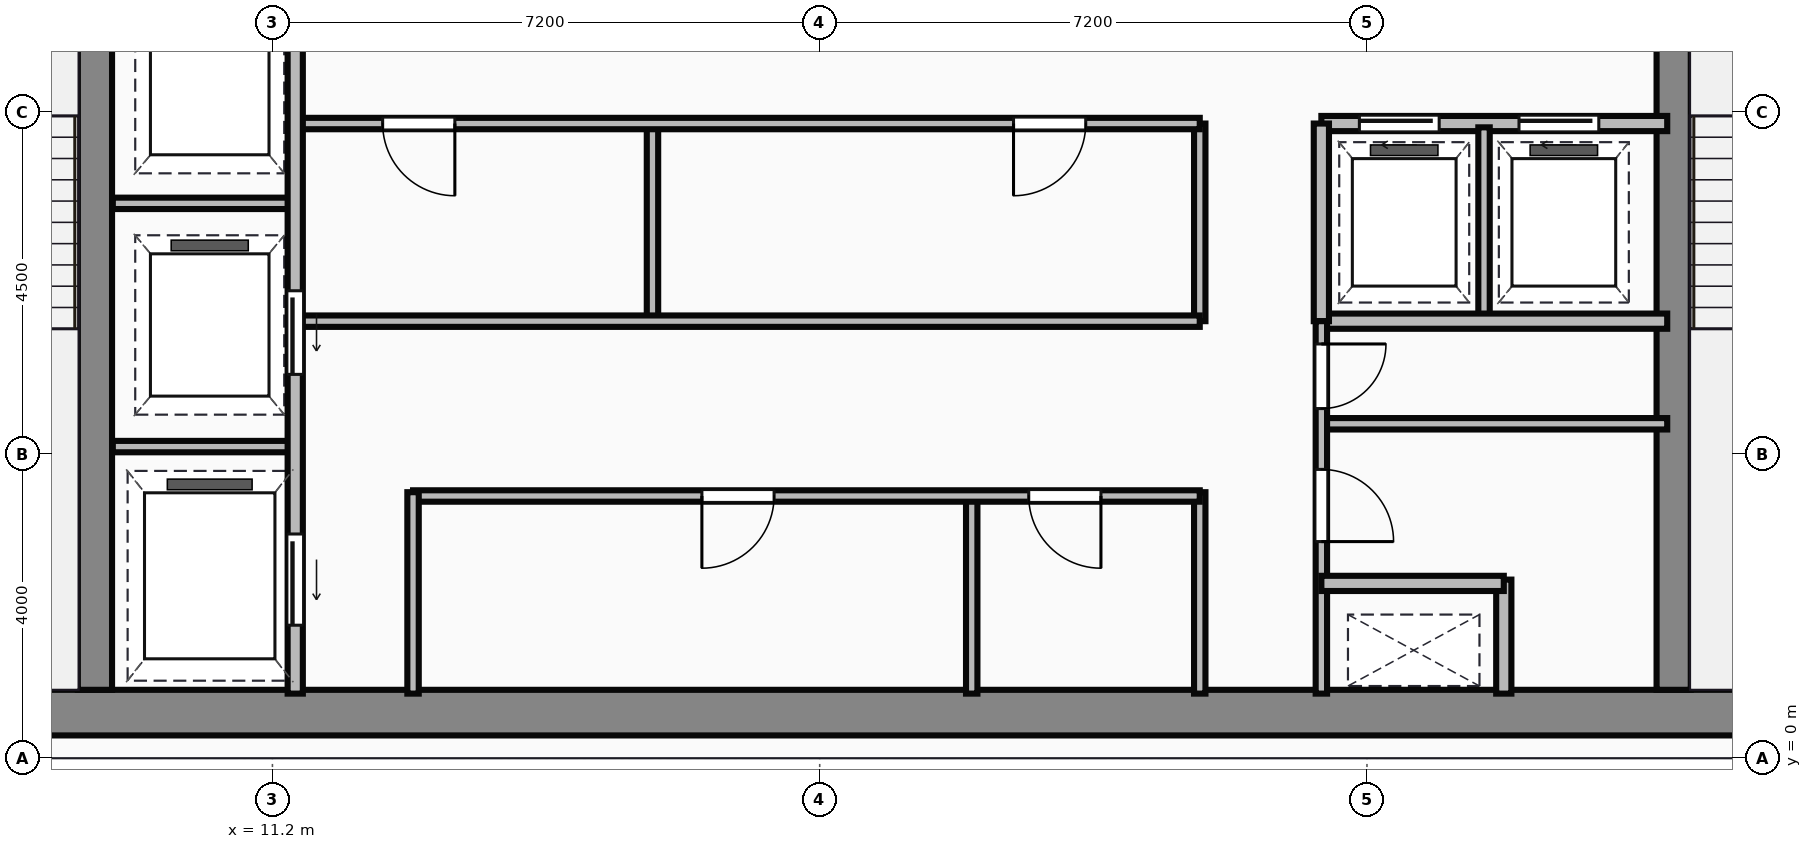
"""IFC4 building model, lengths in metres.
Left out: names, types, materials, properties, quantities, classifications, styles, units other than length and angle.
Written with IfcOpenShell. Run it as: python <this file> out.ifc"""

import sys

from ifc_helpers import new_model, si_unit, direction, frame, frame_2d, origin, place, context, subcontext, project, spatial, rectangle, extrude, source, transform, mapped, element, fill, save


model = new_model("IFC4")
c1 = context("Model", 3, precision=1e-05, world=origin(), true_north=direction((0.0, 1.0)))
c2 = subcontext(c1, "Body", "Model", "MODEL_VIEW")
j1 = project(units=[si_unit("LENGTHUNIT", "METRE"), si_unit("PLANEANGLEUNIT", "RADIAN")], contexts=[c1])
p1 = place(None, origin())
s1 = spatial("IfcSite", under=j1, at=p1, CompositionType="ELEMENT")
p2 = place(p1, origin())
s2 = spatial("IfcBuilding", under=s1, at=p2, CompositionType="ELEMENT")
p3 = place(p2, frame((0.0, 0.0, 277.05)))
s3 = spatial("IfcBuildingStorey", under=s2, at=p3, CompositionType="ELEMENT", Elevation=277.05)
m1 = source(origin(), c2, "Body", "SweptSolid", [
    extrude(rectangle(XDim=29.5, YDim=0.6, at=frame_2d((14.75, 0.0))), origin(), (0.0, 0.0, 1.0), 3.65),
])
p4 = place(p3, frame((4.5, 0.6, 0.0), z_axis=(0.0, 0.0, 1.0), x_axis=(1.0, 0.0, 0.0)))
e1 = element("IfcWall", 1, at=p4, inside=s3, PredefinedType="SHEAR", context=c2, shape_type="MappedRepresentation", body=[
    mapped(m1, transform((0.0, 0.0, 0.0))),
])
m2 = source(origin(), c2, "Body", "SweptSolid", [
    extrude(rectangle(XDim=12.5, YDim=0.45, at=frame_2d((6.25, 0.0))), origin(), (0.0, 0.0, 1.0), 3.65),
])
for number, where, z_axis, x_axis in (
    (2, (8.865, 0.9, 0.0), (0.0, 0.0, 1.0), (0.0, 1.0, 0.0)),
    (3, (29.635, 0.9, 0.0), (0.0, 0.0, 1.0), (0.0, 1.0, 0.0)),
):
    element("IfcWall", number, at=place(p3, frame(where, z_axis=z_axis, x_axis=x_axis)), inside=s3, PredefinedType="SHEAR", context=c2, shape_type="MappedRepresentation", body=[
        mapped(m2, transform((0.0, 0.0, 0.0))),
    ])
m3 = source(origin(), c2, "Body", "SweptSolid", [
    extrude(rectangle(XDim=9.6, YDim=0.2, at=frame_2d((4.8, 0.0))), origin(), (0.0, 0.0, 1.0), 3.4),
])
p5 = place(p3, frame((11.5, 0.85, 0.0), z_axis=(0.0, 0.0, 1.0), x_axis=(0.0, 1.0, 0.0)))
e4 = element("IfcWall", 4, at=p5, inside=s3, PredefinedType="PARTITIONING", context=c2, shape_type="MappedRepresentation", body=[
    mapped(m3, transform((0.0, 0.0, 0.0))),
])
p6 = place(p5, frame((4.2, 0.0, 0.0)))
e5 = element("IfcOpeningElement", 5, at=p6, cuts=e4, PredefinedType="OPENING", context=c2, shape_type="SweptSolid", body=[
    extrude(rectangle(XDim=1.1, YDim=2.15, at=frame_2d((0.55, 1.075))), frame((0.0, 0.11, 0.0), z_axis=(0.0, -1.0, 0.0), x_axis=(1.0, 0.0, 0.0)), (0.0, 0.0, 1.0), 0.22),
])
p7 = place(p5, frame((0.9, 0.0, 0.0)))
e6 = element("IfcOpeningElement", 6, at=p7, cuts=e4, PredefinedType="OPENING", context=c2, shape_type="SweptSolid", body=[
    extrude(rectangle(XDim=1.2, YDim=2.15, at=frame_2d((0.6, 1.075))), frame((0.0, 0.11, 0.0), z_axis=(0.0, -1.0, 0.0), x_axis=(1.0, 0.0, 0.0)), (0.0, 0.0, 1.0), 0.22),
])
m4 = source(origin(), c2, "Body", "SweptSolid", [
    extrude(rectangle(XDim=2.4, YDim=0.15, at=frame_2d((1.2, 0.0))), origin(), (0.0, 0.0, 1.0), 3.4),
])
for number, where, z_axis, x_axis in (
    (7, (9.1, 4.1, 0.0), (0.0, 0.0, 1.0), (1.0, 0.0, 0.0)),
    (8, (9.1, 7.3, 0.0), (0.0, 0.0, 1.0), (1.0, 0.0, 0.0)),
):
    element("IfcWall", number, at=place(p3, frame(where, z_axis=z_axis, x_axis=x_axis)), inside=s3, PredefinedType="PARTITIONING", context=c2, shape_type="MappedRepresentation", body=[
        mapped(m4, transform((0.0, 0.0, 0.0))),
    ])
m5 = source(origin(), c2, "Body", "SweptSolid", [
    extrude(rectangle(XDim=2.65, YDim=0.15, at=frame_2d((1.325, 0.0))), origin(), (0.0, 0.0, 1.0), 3.4),
])
p8 = place(p3, frame((13.05, 0.85, 0.0), z_axis=(0.0, 0.0, 1.0), x_axis=(0.0, 1.0, 0.0)))
e9 = element("IfcWall", 9, at=p8, inside=s3, PredefinedType="PARTITIONING", context=c2, shape_type="MappedRepresentation", body=[
    mapped(m5, transform((0.0, 0.0, 0.0))),
])
m6 = source(origin(), c2, "Body", "SweptSolid", [
    extrude(rectangle(XDim=10.35, YDim=0.15, at=frame_2d((5.175, 0.0))), origin(), (0.0, 0.0, 1.0), 3.4),
])
p9 = place(p3, frame((13.05, 3.45, 0.0), z_axis=(0.0, 0.0, 1.0), x_axis=(1.0, 0.0, 0.0)))
e10 = element("IfcWall", 10, at=p9, inside=s3, PredefinedType="PARTITIONING", context=c2, shape_type="MappedRepresentation", body=[
    mapped(m6, transform((0.0, 0.0, 0.0))),
])
p10 = place(p9, frame((3.8, 0.0, 0.0)))
e11 = element("IfcOpeningElement", 11, at=p10, cuts=e10, PredefinedType="OPENING", context=c2, shape_type="SweptSolid", body=[
    extrude(rectangle(XDim=0.95, YDim=2.15, at=frame_2d((0.475, 1.075))), frame((0.0, 0.085, 0.0), z_axis=(0.0, -1.0, 0.0), x_axis=(1.0, 0.0, 0.0)), (0.0, 0.0, 1.0), 0.17),
])
p11 = place(p9, frame((8.1, 0.0, 0.0)))
e12 = element("IfcOpeningElement", 12, at=p11, cuts=e10, PredefinedType="OPENING", context=c2, shape_type="SweptSolid", body=[
    extrude(rectangle(XDim=0.95, YDim=2.15, at=frame_2d((0.475, 1.075))), frame((0.0, 0.085, 0.0), z_axis=(0.0, -1.0, 0.0), x_axis=(1.0, 0.0, 0.0)), (0.0, 0.0, 1.0), 0.17),
])
p12 = place(p3, frame((23.4, 0.85, 0.0), z_axis=(0.0, 0.0, 1.0), x_axis=(0.0, 1.0, 0.0)))
e13 = element("IfcWall", 13, at=p12, inside=s3, PredefinedType="PARTITIONING", context=c2, shape_type="MappedRepresentation", body=[
    mapped(m5, transform((0.0, 0.0, 0.0))),
])
m7 = source(origin(), c2, "Body", "SweptSolid", [
    extrude(rectangle(XDim=2.6, YDim=0.15, at=frame_2d((1.3, 0.0))), origin(), (0.0, 0.0, 1.0), 3.4),
])
p13 = place(p3, frame((20.4, 0.85, 0.0), z_axis=(0.0, 0.0, 1.0), x_axis=(0.0, 1.0, 0.0)))
e14 = element("IfcWall", 14, at=p13, inside=s3, PredefinedType="PARTITIONING", context=c2, shape_type="MappedRepresentation", body=[
    mapped(m7, transform((0.0, 0.0, 0.0))),
])
m8 = source(origin(), c2, "Body", "SweptSolid", [
    extrude(rectangle(XDim=11.85, YDim=0.15, at=frame_2d((5.925, 0.0))), origin(), (0.0, 0.0, 1.0), 3.4),
])
p14 = place(p3, frame((11.55, 5.75, 0.0), z_axis=(0.0, 0.0, 1.0), x_axis=(1.0, 0.0, 0.0)))
e15 = element("IfcWall", 15, at=p14, inside=s3, PredefinedType="PARTITIONING", context=c2, shape_type="MappedRepresentation", body=[
    mapped(m8, transform((0.0, 0.0, 0.0))),
])
p15 = place(p3, frame((11.55, 8.35, 0.0), z_axis=(0.0, 0.0, 1.0), x_axis=(1.0, 0.0, 0.0)))
e16 = element("IfcWall", 16, at=p15, inside=s3, PredefinedType="PARTITIONING", context=c2, shape_type="MappedRepresentation", body=[
    mapped(m8, transform((0.0, 0.0, 0.0))),
])
p16 = place(p15, frame((1.1, 0.0, 0.0)))
e17 = element("IfcOpeningElement", 17, at=p16, cuts=e16, PredefinedType="OPENING", context=c2, shape_type="SweptSolid", body=[
    extrude(rectangle(XDim=0.95, YDim=2.15, at=frame_2d((0.475, 1.075))), frame((0.0, 0.085, 0.0), z_axis=(0.0, -1.0, 0.0), x_axis=(1.0, 0.0, 0.0)), (0.0, 0.0, 1.0), 0.17),
])
p17 = place(p15, frame((9.4, 0.0, 0.0)))
e18 = element("IfcOpeningElement", 18, at=p17, cuts=e16, PredefinedType="OPENING", context=c2, shape_type="SweptSolid", body=[
    extrude(rectangle(XDim=0.95, YDim=2.15, at=frame_2d((0.475, 1.075))), frame((0.0, 0.085, 0.0), z_axis=(0.0, -1.0, 0.0), x_axis=(1.0, 0.0, 0.0)), (0.0, 0.0, 1.0), 0.17),
])
m9 = source(origin(), c2, "Body", "SweptSolid", [
    extrude(rectangle(XDim=2.6, YDim=0.15, at=frame_2d((1.3, 0.0))), origin(), (0.0, 0.0, 1.0), 3.4),
])
p18 = place(p3, frame((23.4, 5.75, 0.0), z_axis=(0.0, 0.0, 1.0), x_axis=(0.0, 1.0, 0.0)))
e19 = element("IfcWall", 19, at=p18, inside=s3, PredefinedType="PARTITIONING", context=c2, shape_type="MappedRepresentation", body=[
    mapped(m9, transform((0.0, 0.0, 0.0))),
])
m10 = source(origin(), c2, "Body", "SweptSolid", [
    extrude(rectangle(XDim=2.5, YDim=0.15, at=frame_2d((1.25, 0.0))), origin(), (0.0, 0.0, 1.0), 3.4),
])
p19 = place(p3, frame((16.2, 5.8, 0.0), z_axis=(0.0, 0.0, 1.0), x_axis=(0.0, 1.0, 0.0)))
e20 = element("IfcWall", 20, at=p19, inside=s3, PredefinedType="PARTITIONING", context=c2, shape_type="MappedRepresentation", body=[
    mapped(m10, transform((0.0, 0.0, 0.0))),
])
m11 = source(origin(), c2, "Body", "SweptSolid", [
    extrude(rectangle(XDim=4.55, YDim=0.2, at=frame_2d((2.275, 0.0))), origin(), (0.0, 0.0, 1.0), 3.4),
])
p20 = place(p3, frame((25.0, 8.35, 0.0), z_axis=(0.0, 0.0, 1.0), x_axis=(1.0, 0.0, 0.0)))
e21 = element("IfcWall", 21, at=p20, inside=s3, PredefinedType="PARTITIONING", context=c2, shape_type="MappedRepresentation", body=[
    mapped(m11, transform((0.0, 0.0, 0.0))),
])
p21 = place(p20, frame((0.5, 0.0, 0.0)))
e22 = element("IfcOpeningElement", 22, at=p21, cuts=e21, PredefinedType="OPENING", context=c2, shape_type="SweptSolid", body=[
    extrude(rectangle(XDim=1.05, YDim=2.15, at=frame_2d((0.525, 1.075))), frame((0.0, 0.11, 0.0), z_axis=(0.0, -1.0, 0.0), x_axis=(1.0, 0.0, 0.0)), (0.0, 0.0, 1.0), 0.22),
])
p22 = place(p20, frame((2.6, 0.0, 0.0)))
e23 = element("IfcOpeningElement", 23, at=p22, cuts=e21, PredefinedType="OPENING", context=c2, shape_type="SweptSolid", body=[
    extrude(rectangle(XDim=1.05, YDim=2.15, at=frame_2d((0.525, 1.075))), frame((0.0, 0.11, 0.0), z_axis=(0.0, -1.0, 0.0), x_axis=(1.0, 0.0, 0.0)), (0.0, 0.0, 1.0), 0.22),
])
p23 = place(p3, frame((25.0, 5.75, 0.0), z_axis=(0.0, 0.0, 1.0), x_axis=(1.0, 0.0, 0.0)))
e24 = element("IfcWall", 24, at=p23, inside=s3, PredefinedType="PARTITIONING", context=c2, shape_type="MappedRepresentation", body=[
    mapped(m11, transform((0.0, 0.0, 0.0))),
])
m12 = source(origin(), c2, "Body", "SweptSolid", [
    extrude(rectangle(XDim=2.6, YDim=0.2, at=frame_2d((1.3, 0.0))), origin(), (0.0, 0.0, 1.0), 3.4),
])
p24 = place(p3, frame((25.0, 5.75, 0.0), z_axis=(0.0, 0.0, 1.0), x_axis=(0.0, 1.0, 0.0)))
e25 = element("IfcWall", 25, at=p24, inside=s3, PredefinedType="PARTITIONING", context=c2, shape_type="MappedRepresentation", body=[
    mapped(m12, transform((0.0, 0.0, 0.0))),
])
p25 = place(p3, frame((27.14, 5.8, 0.0), z_axis=(0.0, 0.0, 1.0), x_axis=(0.0, 1.0, 0.0)))
e26 = element("IfcWall", 26, at=p25, inside=s3, PredefinedType="PARTITIONING", context=c2, shape_type="MappedRepresentation", body=[
    mapped(m10, transform((0.0, 0.0, 0.0))),
])
m13 = source(origin(), c2, "Body", "SweptSolid", [
    extrude(rectangle(XDim=4.9, YDim=0.15, at=frame_2d((2.45, 0.0))), origin(), (0.0, 0.0, 1.0), 3.4),
])
p26 = place(p3, frame((25.0, 0.85, 0.0), z_axis=(0.0, 0.0, 1.0), x_axis=(0.0, 1.0, 0.0)))
e27 = element("IfcWall", 27, at=p26, inside=s3, PredefinedType="PARTITIONING", context=c2, shape_type="MappedRepresentation", body=[
    mapped(m13, transform((0.0, 0.0, 0.0))),
])
p27 = place(p26, frame((2.0, 0.0, 0.0)))
e28 = element("IfcOpeningElement", 28, at=p27, cuts=e27, PredefinedType="OPENING", context=c2, shape_type="SweptSolid", body=[
    extrude(rectangle(XDim=0.95, YDim=2.15, at=frame_2d((0.475, 1.075))), frame((0.0, 0.085, 0.0), z_axis=(0.0, -1.0, 0.0), x_axis=(1.0, 0.0, 0.0)), (0.0, 0.0, 1.0), 0.17),
])
p28 = place(p26, frame((3.75, 0.0, 0.0)))
e29 = element("IfcOpeningElement", 29, at=p28, cuts=e27, PredefinedType="OPENING", context=c2, shape_type="SweptSolid", body=[
    extrude(rectangle(XDim=0.85, YDim=2.15, at=frame_2d((0.425, 1.075))), frame((0.0, 0.085, 0.0), z_axis=(0.0, -1.0, 0.0), x_axis=(1.0, 0.0, 0.0)), (0.0, 0.0, 1.0), 0.17),
])
m14 = source(origin(), c2, "Body", "SweptSolid", [
    extrude(rectangle(XDim=2.4, YDim=0.2, at=frame_2d((1.2, 0.0))), origin(), (0.0, 0.0, 1.0), 3.4),
])
p29 = place(p3, frame((25.0, 2.3, 0.0), z_axis=(0.0, 0.0, 1.0), x_axis=(1.0, 0.0, 0.0)))
e30 = element("IfcWall", 30, at=p29, inside=s3, PredefinedType="PARTITIONING", context=c2, shape_type="MappedRepresentation", body=[
    mapped(m14, transform((0.0, 0.0, 0.0))),
])
m15 = source(origin(), c2, "Body", "SweptSolid", [
    extrude(rectangle(XDim=1.5, YDim=0.2, at=frame_2d((0.75, 0.0))), origin(), (0.0, 0.0, 1.0), 3.4),
])
p30 = place(p3, frame((27.4, 0.85, 0.0), z_axis=(0.0, 0.0, 1.0), x_axis=(0.0, 1.0, 0.0)))
e31 = element("IfcWall", 31, at=p30, inside=s3, PredefinedType="PARTITIONING", context=c2, shape_type="MappedRepresentation", body=[
    mapped(m15, transform((0.0, 0.0, 0.0))),
])
m16 = source(origin(), c2, "Body", "SweptSolid", [
    extrude(rectangle(XDim=4.55, YDim=0.15, at=frame_2d((2.275, 0.0))), origin(), (0.0, 0.0, 1.0), 3.4),
])
p31 = place(p3, frame((25.0, 4.4, 0.0), z_axis=(0.0, 0.0, 1.0), x_axis=(1.0, 0.0, 0.0)))
e32 = element("IfcWall", 32, at=p31, inside=s3, PredefinedType="PARTITIONING", context=c2, shape_type="MappedRepresentation", body=[
    mapped(m16, transform((0.0, 0.0, 0.0))),
])
m17 = source(origin(), c2, "Body", "SweptSolid", [
    extrude(rectangle(XDim=1.1, YDim=2.15, at=frame_2d((0.55, 1.075))), frame((0.0, 0.025, 0.0), z_axis=(0.0, -1.0, 0.0), x_axis=(1.0, 0.0, 0.0)), (0.0, 0.0, 1.0), 0.05),
])
p32 = place(p6, frame((1.1, 0.0, 0.0), z_axis=(0.0, 0.0, 1.0), x_axis=(-1.0, 0.0, 0.0)))
e33 = element("IfcDoor", 33, at=p32, inside=s3, OperationType="SLIDING_TO_LEFT", PredefinedType="DOOR", context=c2, shape_type="MappedRepresentation", body=[
    mapped(m17, transform((0.0, 0.0, 0.0))),
])
fill(e5, e33)
m18 = source(origin(), c2, "Body", "SweptSolid", [
    extrude(rectangle(XDim=1.2, YDim=2.15, at=frame_2d((0.6, 1.075))), frame((0.0, 0.025, 0.0), z_axis=(0.0, -1.0, 0.0), x_axis=(1.0, 0.0, 0.0)), (0.0, 0.0, 1.0), 0.05),
])
p33 = place(p7, frame((1.2, 0.0, 0.0), z_axis=(0.0, 0.0, 1.0), x_axis=(-1.0, 0.0, 0.0)))
e34 = element("IfcDoor", 34, at=p33, inside=s3, OperationType="SLIDING_TO_LEFT", PredefinedType="DOOR", context=c2, shape_type="MappedRepresentation", body=[
    mapped(m18, transform((0.0, 0.0, 0.0))),
])
fill(e6, e34)
m19 = source(origin(), c2, "Body", "SweptSolid", [
    extrude(rectangle(XDim=0.95, YDim=2.15, at=frame_2d((0.475, 1.075))), frame((0.0, 0.025, 0.0), z_axis=(0.0, -1.0, 0.0), x_axis=(1.0, 0.0, 0.0)), (0.0, 0.0, 1.0), 0.05),
])
p34 = place(p10, origin())
e35 = element("IfcDoor", 35, at=p34, inside=s3, OperationType="SINGLE_SWING_LEFT", PredefinedType="DOOR", context=c2, shape_type="MappedRepresentation", body=[
    mapped(m19, transform((0.0, 0.0, 0.0))),
])
fill(e11, e35)
p35 = place(p11, origin())
e36 = element("IfcDoor", 36, at=p35, inside=s3, OperationType="SINGLE_SWING_RIGHT", PredefinedType="DOOR", context=c2, shape_type="MappedRepresentation", body=[
    mapped(m19, transform((0.0, 0.0, 0.0))),
])
fill(e12, e36)
p36 = place(p16, origin())
e37 = element("IfcDoor", 37, at=p36, inside=s3, OperationType="SINGLE_SWING_RIGHT", PredefinedType="DOOR", context=c2, shape_type="MappedRepresentation", body=[
    mapped(m19, transform((0.0, 0.0, 0.0))),
])
fill(e17, e37)
p37 = place(p17, origin())
e38 = element("IfcDoor", 38, at=p37, inside=s3, OperationType="SINGLE_SWING_LEFT", PredefinedType="DOOR", context=c2, shape_type="MappedRepresentation", body=[
    mapped(m19, transform((0.0, 0.0, 0.0))),
])
fill(e18, e38)
m20 = source(origin(), c2, "Body", "SweptSolid", [
    extrude(rectangle(XDim=1.05, YDim=2.15, at=frame_2d((0.525, 1.075))), frame((0.0, 0.025, 0.0), z_axis=(0.0, -1.0, 0.0), x_axis=(1.0, 0.0, 0.0)), (0.0, 0.0, 1.0), 0.05),
])
p38 = place(p21, origin())
e39 = element("IfcDoor", 39, at=p38, inside=s3, OperationType="SLIDING_TO_LEFT", PredefinedType="DOOR", context=c2, shape_type="MappedRepresentation", body=[
    mapped(m20, transform((0.0, 0.0, 0.0))),
])
fill(e22, e39)
p39 = place(p22, origin())
e40 = element("IfcDoor", 40, at=p39, inside=s3, OperationType="SLIDING_TO_LEFT", PredefinedType="DOOR", context=c2, shape_type="MappedRepresentation", body=[
    mapped(m20, transform((0.0, 0.0, 0.0))),
])
fill(e23, e40)
p40 = place(p27, origin())
e41 = element("IfcDoor", 41, at=p40, inside=s3, OperationType="SINGLE_SWING_LEFT", PredefinedType="DOOR", context=c2, shape_type="MappedRepresentation", body=[
    mapped(m19, transform((0.0, 0.0, 0.0))),
])
fill(e28, e41)
m21 = source(origin(), c2, "Body", "SweptSolid", [
    extrude(rectangle(XDim=0.85, YDim=2.15, at=frame_2d((0.425, 1.075))), frame((0.0, 0.025, 0.0), z_axis=(0.0, -1.0, 0.0), x_axis=(1.0, 0.0, 0.0)), (0.0, 0.0, 1.0), 0.05),
])
p41 = place(p28, origin())
e42 = element("IfcDoor", 42, at=p41, inside=s3, OperationType="SINGLE_SWING_RIGHT", PredefinedType="DOOR", context=c2, shape_type="MappedRepresentation", body=[
    mapped(m21, transform((0.0, 0.0, 0.0))),
])
fill(e29, e42)
save(model, sys.argv[1])
